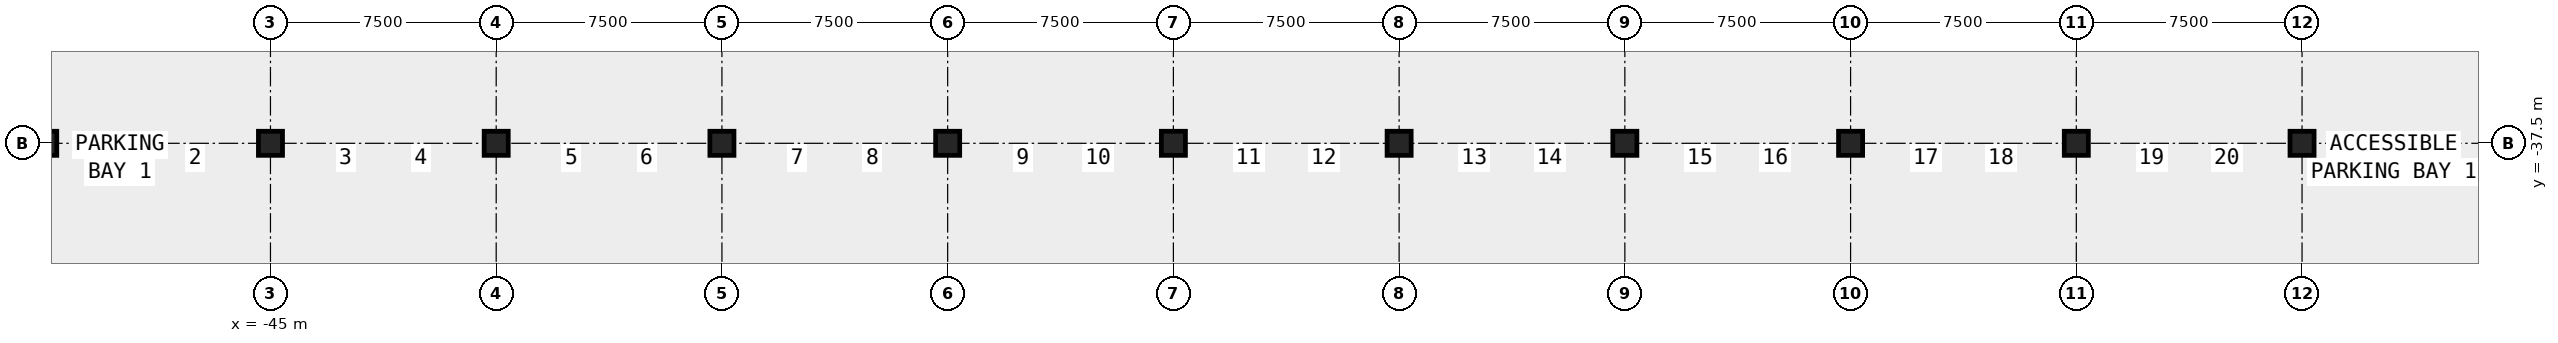
"""IFC4 building model, lengths in metres.
Left out: names, types, materials, properties, quantities, classifications, styles, units other than length and angle.
Written with IfcOpenShell. Run it as: python <this file> out.ifc"""

import sys

from ifc_helpers import new_model, si_unit, direction, frame, origin, origin_2d, place, context, subcontext, project, spatial, rectangle, extrude, element, save


model = new_model("IFC4")
c1 = context("Model", 3, precision=1e-05, world=origin(), true_north=direction((0.0, 1.0)))
c2 = subcontext(c1, "Body", "Model", "MODEL_VIEW")
j1 = project(units=[si_unit("LENGTHUNIT", "METRE"), si_unit("PLANEANGLEUNIT", "RADIAN")], contexts=[c1])
p1 = place(None, origin())
s1 = spatial("IfcSite", under=j1, at=p1, CompositionType="ELEMENT")
p2 = place(p1, origin())
s2 = spatial("IfcBuilding", under=s1, at=p2, CompositionType="ELEMENT")
p3 = place(p2, frame((0.0, 0.0, -5.5)))
s3 = spatial("IfcBuildingStorey", under=s2, at=p3, CompositionType="ELEMENT", Elevation=-5.5)
for number, where, z_axis, x_axis in (
    (1, (-52.5, -37.5, -0.42), (0.0, 0.0, 1.0), (1.0, 0.0, 0.0)),
    (2, (-45.0, -37.5, -0.42), (0.0, 0.0, 1.0), (1.0, 0.0, 0.0)),
    (3, (-37.5, -37.5, -0.42), (0.0, 0.0, 1.0), (1.0, 0.0, 0.0)),
    (4, (-30.0, -37.5, -0.42), (0.0, 0.0, 1.0), (1.0, 0.0, 0.0)),
    (5, (-22.5, -37.5, -0.42), (0.0, 0.0, 1.0), (1.0, 0.0, 0.0)),
    (6, (-15.0, -37.5, -0.42), (0.0, 0.0, 1.0), (1.0, 0.0, 0.0)),
    (7, (-7.5, -37.5, -0.42), (0.0, 0.0, 1.0), (1.0, 0.0, 0.0)),
    (8, (0.0, -37.5, -0.42), (0.0, 0.0, 1.0), (1.0, 0.0, 0.0)),
    (9, (7.5, -37.5, -0.42), (0.0, 0.0, 1.0), (1.0, 0.0, 0.0)),
    (10, (15.0, -37.5, -0.42), (0.0, 0.0, 1.0), (1.0, 0.0, 0.0)),
    (11, (22.5, -37.5, -0.42), (0.0, 0.0, 1.0), (1.0, 0.0, 0.0)),
):
    element("IfcColumn", number, at=place(p3, frame(where, z_axis=z_axis, x_axis=x_axis)), inside=s3, PredefinedType="COLUMN", context=c2, shape_type="SweptSolid", body=[
        extrude(rectangle(XDim=0.8, YDim=0.8, at=origin_2d()), origin(), (0.0, 0.0, 1.0), 5.72),
    ])
save(model, sys.argv[1])
